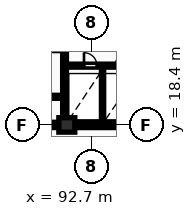
"""IFC4 building model, lengths in metres.
Left out: names, types, materials, properties, quantities, classifications, styles, units other than length and angle.
Written with IfcOpenShell. Run it as: python <this file> out.ifc"""

import sys

from ifc_helpers import new_model, si_unit, direction, frame, frame_2d, origin, origin_2d, place, context, subcontext, project, spatial, rectangle, extrude, element, fill, save


model = new_model("IFC4")
c1 = context("Model", 3, precision=1e-05, world=origin(), true_north=direction((0.0, 1.0)))
c2 = subcontext(c1, "Body", "Model", "MODEL_VIEW")
j1 = project(units=[si_unit("LENGTHUNIT", "METRE"), si_unit("PLANEANGLEUNIT", "RADIAN")], contexts=[c1])
p1 = place(None, origin())
s1 = spatial("IfcSite", under=j1, at=p1, CompositionType="ELEMENT")
p2 = place(p1, origin())
s2 = spatial("IfcBuilding", under=s1, at=p2, CompositionType="ELEMENT")
p3 = place(p2, origin())
s3 = spatial("IfcBuildingStorey", under=s2, at=p3, CompositionType="ELEMENT", Elevation=0.0)
p4 = place(p3, frame((91.1, 18.4, 0.0), z_axis=(0.0, 0.0, 1.0), x_axis=(1.0, 0.0, 0.0)))
e1 = element("IfcColumn", 1, at=p4, inside=s3, PredefinedType="COLUMN", context=c2, shape_type="SweptSolid", body=[
    extrude(rectangle(XDim=1.05, YDim=0.95, at=origin_2d()), origin(), (0.0, 0.0, 1.0), 5.4),
])
p5 = place(p3, frame((81.925, 18.4, 0.0), z_axis=(0.0, 0.0, 1.0), x_axis=(1.0, 0.0, 0.0)))
e2 = element("IfcWall", 2, at=p5, inside=s3, PredefinedType="SHEAR", context=c2, shape_type="SweptSolid", body=[
    extrude(rectangle(XDim=36.265, YDim=0.35, at=frame_2d((18.132, 0.0))), origin(), (0.0, 0.0, 1.0), 5.4),
])
p6 = place(p5, frame((5.675, 0.0, 0.0)))
e3 = element("IfcOpeningElement", 3, at=p6, cuts=e2, PredefinedType="OPENING", context=c2, shape_type="SweptSolid", body=[
    extrude(rectangle(XDim=1.0, YDim=2.15, at=frame_2d((0.5, 1.075))), frame((0.0, 0.185, 0.0), z_axis=(0.0, -1.0, 0.0), x_axis=(1.0, 0.0, 0.0)), (0.0, 0.0, 1.0), 0.37),
])
p7 = place(p5, frame((21.925, 0.0, 0.0)))
e4 = element("IfcOpeningElement", 4, at=p7, cuts=e2, PredefinedType="OPENING", context=c2, shape_type="SweptSolid", body=[
    extrude(rectangle(XDim=1.5, YDim=2.2, at=frame_2d((0.75, 1.1))), frame((0.0, 0.185, 0.0), z_axis=(0.0, -1.0, 0.0), x_axis=(1.0, 0.0, 0.0)), (0.0, 0.0, 1.0), 0.37),
])
p8 = place(p5, frame((29.875, 0.0, 0.0)))
e5 = element("IfcOpeningElement", 5, at=p8, cuts=e2, PredefinedType="OPENING", context=c2, shape_type="SweptSolid", body=[
    extrude(rectangle(XDim=1.0, YDim=2.15, at=frame_2d((0.5, 1.075))), frame((0.0, 0.185, 0.0), z_axis=(0.0, -1.0, 0.0), x_axis=(1.0, 0.0, 0.0)), (0.0, 0.0, 1.0), 0.37),
])
p9 = place(p3, frame((86.5, 20.25, 0.0), z_axis=(0.0, 0.0, 1.0), x_axis=(1.0, 0.0, 0.0)))
e6 = element("IfcWall", 6, at=p9, inside=s3, PredefinedType="PARTITIONING", context=c2, shape_type="SweptSolid", body=[
    extrude(rectangle(XDim=4.32, YDim=0.2, at=frame_2d((2.16, 0.0))), origin(), (0.0, 0.0, 1.0), 5.1),
])
p10 = place(p9, frame((1.4, 0.0, 0.0)))
e7 = element("IfcOpeningElement", 7, at=p10, cuts=e6, PredefinedType="OPENING", context=c2, shape_type="SweptSolid", body=[
    extrude(rectangle(XDim=1.1, YDim=2.1, at=frame_2d((0.55, 1.05))), frame((0.0, 0.11, 0.0), z_axis=(0.0, -1.0, 0.0), x_axis=(1.0, 0.0, 0.0)), (0.0, 0.0, 1.0), 0.22),
])
p11 = place(p3, frame((90.95, 18.6, 0.0), z_axis=(0.0, 0.0, 1.0), x_axis=(0.0, 1.0, 0.0)))
e8 = element("IfcWall", 8, at=p11, inside=s3, PredefinedType="SHEAR", context=c2, shape_type="SweptSolid", body=[
    extrude(rectangle(XDim=11.6, YDim=0.25, at=frame_2d((5.8, 0.0))), origin(), (0.0, 0.0, 1.0), 5.4),
])
p12 = place(p11, frame((4.6, 0.0, 0.0)))
e9 = element("IfcOpeningElement", 9, at=p12, cuts=e8, PredefinedType="OPENING", context=c2, shape_type="SweptSolid", body=[
    extrude(rectangle(XDim=1.1, YDim=2.1, at=frame_2d((0.55, 1.05))), frame((0.0, 0.135, 0.0), z_axis=(0.0, -1.0, 0.0), x_axis=(1.0, 0.0, 0.0)), (0.0, 0.0, 1.0), 0.27),
])
p13 = place(p3, frame((93.45, 18.6, 0.0), z_axis=(0.0, 0.0, 1.0), x_axis=(0.0, 1.0, 0.0)))
e10 = element("IfcWall", 10, at=p13, inside=s3, PredefinedType="PARTITIONING", context=c2, shape_type="SweptSolid", body=[
    extrude(rectangle(XDim=3.6, YDim=0.15, at=frame_2d((1.8, 0.0))), origin(), (0.0, 0.0, 1.0), 5.1),
])
p14 = place(p3, frame((91.08, 22.3, 0.0), z_axis=(0.0, 0.0, 1.0), x_axis=(1.0, 0.0, 0.0)))
e11 = element("IfcWall", 11, at=p14, inside=s3, PredefinedType="PARTITIONING", context=c2, shape_type="SweptSolid", body=[
    extrude(rectangle(XDim=19.14, YDim=0.2, at=frame_2d((9.57, 0.0))), origin(), (0.0, 0.0, 1.0), 5.1),
])
p15 = place(p14, frame((1.15, 0.0, 0.0)))
e12 = element("IfcOpeningElement", 12, at=p15, cuts=e11, PredefinedType="OPENING", context=c2, shape_type="SweptSolid", body=[
    extrude(rectangle(XDim=0.85, YDim=2.05, at=frame_2d((0.425, 1.025))), frame((0.0, 0.11, 0.0), z_axis=(0.0, -1.0, 0.0), x_axis=(1.0, 0.0, 0.0)), (0.0, 0.0, 1.0), 0.22),
])
p16 = place(p14, frame((3.2, 0.0, 0.0)))
e13 = element("IfcOpeningElement", 13, at=p16, cuts=e11, PredefinedType="OPENING", context=c2, shape_type="SweptSolid", body=[
    extrude(rectangle(XDim=0.85, YDim=2.05, at=frame_2d((0.425, 1.025))), frame((0.0, 0.11, 0.0), z_axis=(0.0, -1.0, 0.0), x_axis=(1.0, 0.0, 0.0)), (0.0, 0.0, 1.0), 0.22),
])
p17 = place(p14, frame((12.72, 0.0, 0.0)))
e14 = element("IfcOpeningElement", 14, at=p17, cuts=e11, PredefinedType="OPENING", context=c2, shape_type="SweptSolid", body=[
    extrude(rectangle(XDim=1.5, YDim=2.2, at=frame_2d((0.75, 1.1))), frame((0.0, 0.11, 0.0), z_axis=(0.0, -1.0, 0.0), x_axis=(1.0, 0.0, 0.0)), (0.0, 0.0, 1.0), 0.22),
])
p18 = place(p14, frame((5.52, 0.0, 0.0)))
e15 = element("IfcOpeningElement", 15, at=p18, cuts=e11, PredefinedType="OPENING", context=c2, shape_type="SweptSolid", body=[
    extrude(rectangle(XDim=0.88, YDim=2.06, at=frame_2d((0.44, 1.03))), frame((0.0, 0.11, 0.0), z_axis=(0.0, -1.0, 0.0), x_axis=(1.0, 0.0, 0.0)), (0.0, 0.0, 1.0), 0.22),
])
p19 = place(p14, frame((7.67, 0.0, 0.0)))
e16 = element("IfcOpeningElement", 16, at=p19, cuts=e11, PredefinedType="OPENING", context=c2, shape_type="SweptSolid", body=[
    extrude(rectangle(XDim=0.88, YDim=2.06, at=frame_2d((0.44, 1.03))), frame((0.0, 0.11, 0.0), z_axis=(0.0, -1.0, 0.0), x_axis=(1.0, 0.0, 0.0)), (0.0, 0.0, 1.0), 0.22),
])
p20 = place(p14, frame((10.27, 0.0, 0.0)))
e17 = element("IfcOpeningElement", 17, at=p20, cuts=e11, PredefinedType="OPENING", context=c2, shape_type="SweptSolid", body=[
    extrude(rectangle(XDim=0.85, YDim=2.05, at=frame_2d((0.425, 1.025))), frame((0.0, 0.11, 0.0), z_axis=(0.0, -1.0, 0.0), x_axis=(1.0, 0.0, 0.0)), (0.0, 0.0, 1.0), 0.22),
])
p21 = place(p14, frame((15.92, 0.0, 0.0)))
e18 = element("IfcOpeningElement", 18, at=p21, cuts=e11, PredefinedType="OPENING", context=c2, shape_type="SweptSolid", body=[
    extrude(rectangle(XDim=0.96, YDim=2.1, at=frame_2d((0.48, 1.05))), frame((0.0, 0.11, 0.0), z_axis=(0.0, -1.0, 0.0), x_axis=(1.0, 0.0, 0.0)), (0.0, 0.0, 1.0), 0.22),
])
p22 = place(p15, origin())
e19 = element("IfcDoor", 19, at=p22, inside=s3, OperationType="SINGLE_SWING_LEFT", PredefinedType="DOOR", context=c2, shape_type="SweptSolid", body=[
    extrude(rectangle(XDim=0.85, YDim=2.05, at=frame_2d((0.425, 1.025))), frame((0.0, 0.025, 0.0), z_axis=(0.0, -1.0, 0.0), x_axis=(1.0, 0.0, 0.0)), (0.0, 0.0, 1.0), 0.05),
])
fill(e12, e19)
p23 = place(p16, origin())
e20 = element("IfcDoor", 20, at=p23, inside=s3, OperationType="SINGLE_SWING_RIGHT", PredefinedType="DOOR", context=c2, shape_type="SweptSolid", body=[
    extrude(rectangle(XDim=0.85, YDim=2.05, at=frame_2d((0.425, 1.025))), frame((0.0, 0.025, 0.0), z_axis=(0.0, -1.0, 0.0), x_axis=(1.0, 0.0, 0.0)), (0.0, 0.0, 1.0), 0.05),
])
fill(e13, e20)
save(model, sys.argv[1])
